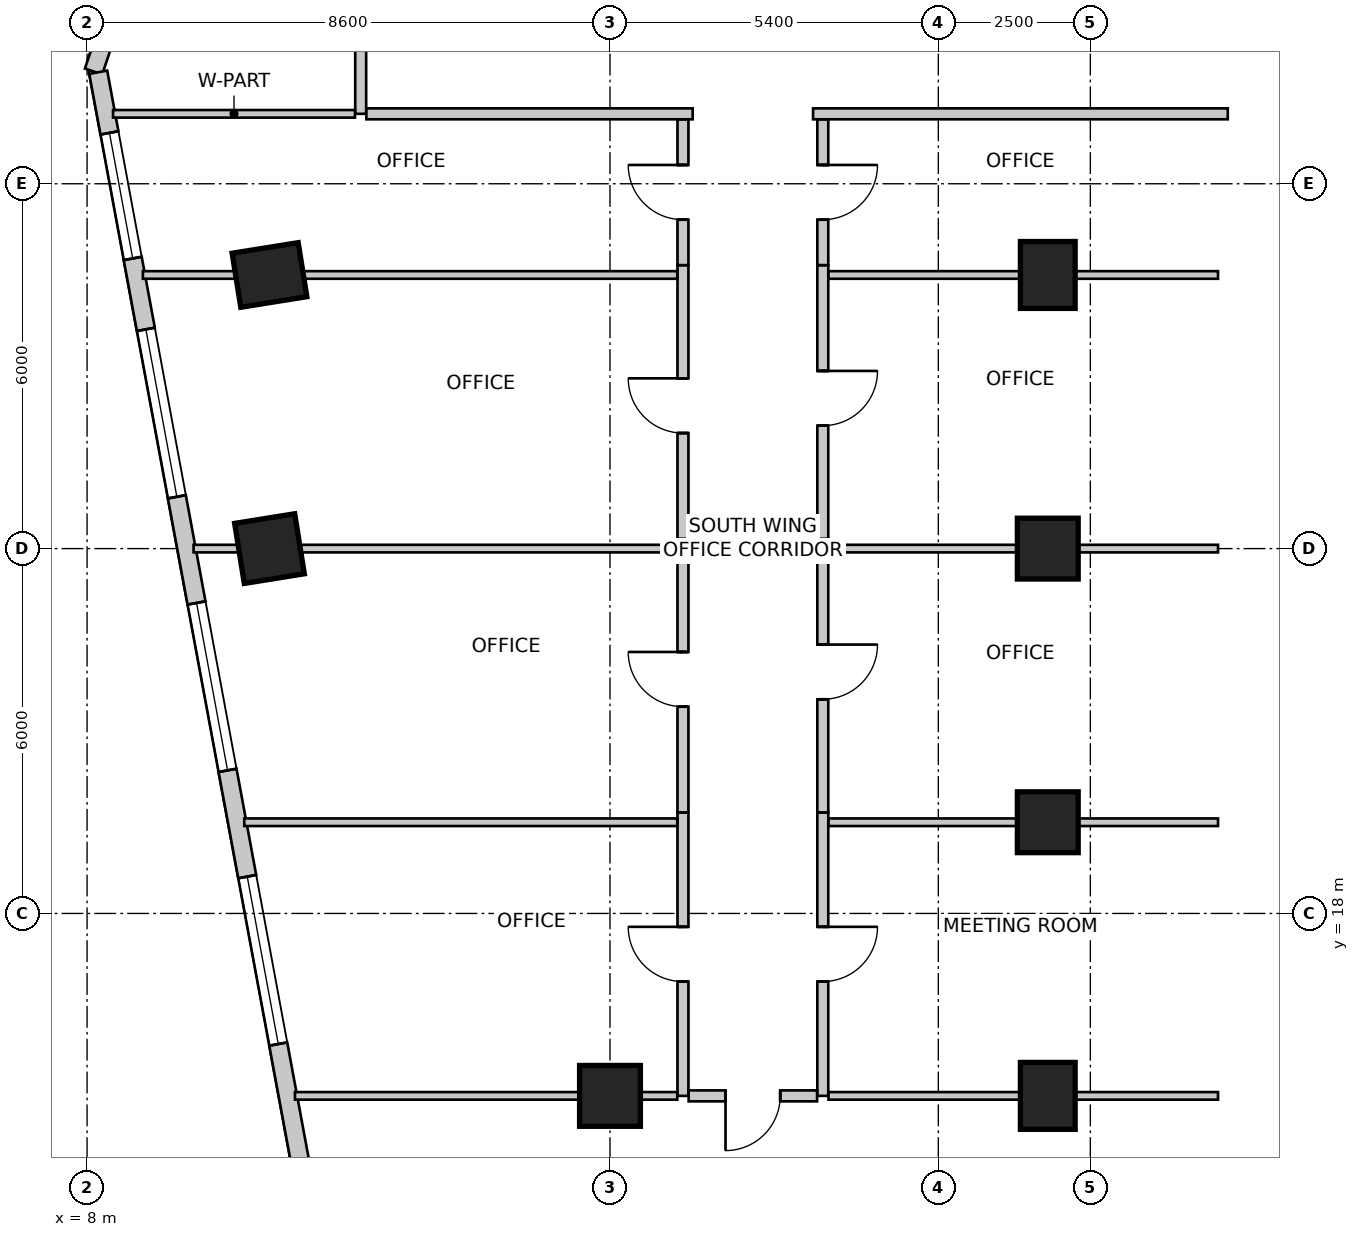
"""IFC4 building model, lengths in metres.
Left out: names, types, materials, properties, quantities, classifications, styles, units other than length and angle.
Written with IfcOpenShell. Run it as: python <this file> out.ifc"""

import sys

from ifc_helpers import new_model, si_unit, direction, frame, frame_2d, origin, origin_2d, place, context, subcontext, project, spatial, rectangle, extrude, source, transform, mapped, element, fill, save


model = new_model("IFC4")
c1 = context("Model", 3, precision=1e-05, world=origin(), true_north=direction((0.0, 1.0)))
c2 = subcontext(c1, "Body", "Model", "MODEL_VIEW")
j1 = project(units=[si_unit("LENGTHUNIT", "METRE"), si_unit("PLANEANGLEUNIT", "RADIAN")], contexts=[c1])
p1 = place(None, origin())
s1 = spatial("IfcSite", under=j1, at=p1, CompositionType="ELEMENT")
p2 = place(p1, origin())
s2 = spatial("IfcBuilding", under=s1, at=p2, CompositionType="ELEMENT")
p3 = place(p2, frame((0.0, 0.0, 55.0)))
s3 = spatial("IfcBuildingStorey", under=s2, at=p3, CompositionType="ELEMENT", Elevation=55.0)
m1 = source(origin(), c2, "Body", "SweptSolid", [
    extrude(rectangle(XDim=0.9, YDim=1.1, at=origin_2d()), origin(), (0.0, 0.0, 1.0), 4.0),
])
p4 = place(p3, frame((11.0, 28.5, 0.0), z_axis=(0.0, 0.0, 1.0), x_axis=(0.158158067254, -0.987413806751, 0.0)))
e1 = element("IfcColumn", 1, at=p4, inside=s3, PredefinedType="COLUMN", context=c2, shape_type="MappedRepresentation", body=[
    mapped(m1, transform((0.0, 0.0, 0.0), scale=1.0)),
])
m2 = source(origin(), c2, "Body", "SweptSolid", [
    extrude(rectangle(XDim=1.0, YDim=1.0, at=origin_2d()), origin(), (0.0, 0.0, 1.0), 4.0),
])
p5 = place(p3, frame((11.0, 24.0, 0.0), z_axis=(0.0, 0.0, 1.0), x_axis=(0.158158067254, -0.987413806751, 0.0)))
e2 = element("IfcColumn", 2, at=p5, inside=s3, PredefinedType="COLUMN", context=c2, shape_type="MappedRepresentation", body=[
    mapped(m2, transform((0.0, 0.0, 0.0), scale=1.0)),
])
p6 = place(p3, frame((23.8, 28.5, 0.0), z_axis=(0.0, 0.0, 1.0), x_axis=(1.0, 0.0, 0.0)))
e3 = element("IfcColumn", 3, at=p6, inside=s3, PredefinedType="COLUMN", context=c2, shape_type="MappedRepresentation", body=[
    mapped(m1, transform((0.0, 0.0, 0.0), scale=1.0)),
])
for number, where, z_axis, x_axis in (
    (4, (23.8, 24.0, 0.0), (0.0, 0.0, 1.0), (1.0, 0.0, 0.0)),
    (5, (23.8, 19.5, 0.0), (0.0, 0.0, 1.0), (1.0, 0.0, 0.0)),
):
    element("IfcColumn", number, at=place(p3, frame(where, z_axis=z_axis, x_axis=x_axis)), inside=s3, PredefinedType="COLUMN", context=c2, shape_type="MappedRepresentation", body=[
        mapped(m2, transform((0.0, 0.0, 0.0), scale=1.0)),
    ])
p7 = place(p3, frame((23.8, 15.0, 0.0), z_axis=(0.0, 0.0, 1.0), x_axis=(1.0, 0.0, 0.0)))
e6 = element("IfcColumn", 6, at=p7, inside=s3, PredefinedType="COLUMN", context=c2, shape_type="MappedRepresentation", body=[
    mapped(m1, transform((0.0, 0.0, 0.0), scale=1.0)),
])
p8 = place(p3, frame((16.6, 15.0, 0.0), z_axis=(0.0, 0.0, 1.0), x_axis=(1.0, 0.0, 0.0)))
e7 = element("IfcColumn", 7, at=p8, inside=s3, PredefinedType="COLUMN", context=c2, shape_type="MappedRepresentation", body=[
    mapped(m2, transform((0.0, 0.0, 0.0), scale=1.0)),
])
p9 = place(p3, frame((13.269, 47.134, 0.0), z_axis=(0.0, 0.0, 1.0), x_axis=(-0.319920423265, -0.947444416722, 0.0)))
e8 = element("IfcWall", 8, at=p9, inside=s3, PredefinedType="SOLIDWALL", context=c2, shape_type="SweptSolid", body=[
    extrude(rectangle(XDim=16.135, YDim=0.3, at=frame_2d((8.067, 0.0))), origin(), (0.0, 0.0, 1.0), 3.75),
])
m3 = source(origin(), c2, "Body", "SweptSolid", [
    extrude(rectangle(XDim=2.4, YDim=2.2, at=frame_2d((1.2, 1.1))), frame((0.0, 0.16, 0.0), z_axis=(0.0, -1.0, 0.0), x_axis=(1.0, 0.0, 0.0)), (0.0, 0.0, 1.0), 0.32),
])
p10 = place(p9, frame((2.188, 0.0, 0.85)))
e9 = element("IfcOpeningElement", 9, at=p10, cuts=e8, PredefinedType="OPENING", context=c2, shape_type="MappedRepresentation", body=[
    mapped(m3, transform((0.0, 0.0, 0.0), scale=1.0)),
])
m4 = source(origin(), c2, "Body", "SweptSolid", [
    extrude(rectangle(XDim=2.8, YDim=2.4, at=frame_2d((1.4, 1.2))), frame((0.0, 0.16, 0.0), z_axis=(0.0, -1.0, 0.0), x_axis=(1.0, 0.0, 0.0)), (0.0, 0.0, 1.0), 0.32),
])
p11 = place(p9, frame((6.959, 0.0, 0.85)))
e10 = element("IfcOpeningElement", 10, at=p11, cuts=e8, PredefinedType="OPENING", context=c2, shape_type="MappedRepresentation", body=[
    mapped(m4, transform((0.0, 0.0, 0.0), scale=1.0)),
])
p12 = place(p9, frame((12.13, 0.0, 0.85)))
e11 = element("IfcOpeningElement", 11, at=p12, cuts=e8, PredefinedType="OPENING", context=c2, shape_type="MappedRepresentation", body=[
    mapped(m3, transform((0.0, 0.0, 0.0), scale=1.0)),
])
p13 = place(p3, frame((8.183, 31.833, 0.0), z_axis=(0.0, 0.0, 1.0), x_axis=(0.18216364648, -0.983268226834, 0.0)))
e12 = element("IfcWall", 12, at=p13, inside=s3, PredefinedType="SOLIDWALL", context=c2, shape_type="SweptSolid", body=[
    extrude(rectangle(XDim=26.678, YDim=0.3, at=frame_2d((13.339, 0.0))), origin(), (0.0, 0.0, 1.0), 3.75),
])
m5 = source(origin(), c2, "Body", "SweptSolid", [
    extrude(rectangle(XDim=2.1, YDim=2.0, at=frame_2d((1.05, 1.0))), frame((0.0, 0.16, 0.0), z_axis=(0.0, -1.0, 0.0), x_axis=(1.0, 0.0, 0.0)), (0.0, 0.0, 1.0), 0.32),
])
p14 = place(p13, frame((1.014, 0.0, 0.85)))
e13 = element("IfcOpeningElement", 13, at=p14, cuts=e12, PredefinedType="OPENING", context=c2, shape_type="MappedRepresentation", body=[
    mapped(m5, transform((0.0, 0.0, 0.0), scale=1.0)),
])
p15 = place(p13, frame((4.3, 0.0, 0.85)))
e14 = element("IfcOpeningElement", 14, at=p15, cuts=e12, PredefinedType="OPENING", context=c2, shape_type="MappedRepresentation", body=[
    mapped(m4, transform((0.0, 0.0, 0.0), scale=1.0)),
])
p16 = place(p13, frame((8.876, 0.0, 0.85)))
e15 = element("IfcOpeningElement", 15, at=p16, cuts=e12, PredefinedType="OPENING", context=c2, shape_type="MappedRepresentation", body=[
    mapped(m4, transform((0.0, 0.0, 0.0), scale=1.0)),
])
p17 = place(p13, frame((13.453, 0.0, 0.85)))
e16 = element("IfcOpeningElement", 16, at=p17, cuts=e12, PredefinedType="OPENING", context=c2, shape_type="MappedRepresentation", body=[
    mapped(m4, transform((0.0, 0.0, 0.0), scale=1.0)),
])
p18 = place(p13, frame((18.211, 0.0, 0.85)))
e17 = element("IfcOpeningElement", 17, at=p18, cuts=e12, PredefinedType="OPENING", context=c2, shape_type="MappedRepresentation", body=[
    mapped(m4, transform((0.0, 0.0, 0.0), scale=1.0)),
])
p19 = place(p13, frame((22.909, 0.0, 0.85)))
e18 = element("IfcOpeningElement", 18, at=p19, cuts=e12, PredefinedType="OPENING", context=c2, shape_type="MappedRepresentation", body=[
    mapped(m3, transform((0.0, 0.0, 0.0), scale=1.0)),
])
p20 = place(p3, frame((12.5, 31.15, 0.0), z_axis=(0.0, 0.0, 1.0), x_axis=(0.0, 1.0, 0.0)))
e19 = element("IfcWall", 19, at=p20, inside=s3, PredefinedType="PARTITIONING", context=c2, shape_type="SweptSolid", body=[
    extrude(rectangle(XDim=2.2, YDim=0.18, at=frame_2d((1.1, 0.0))), origin(), (0.0, 0.0, 1.0), 3.419),
])
p21 = place(p3, frame((17.96, 31.15, 0.0), z_axis=(0.0, 0.0, 1.0), x_axis=(-1.0, 0.0, 0.0)))
e20 = element("IfcWall", 20, at=p21, inside=s3, PredefinedType="PARTITIONING", context=c2, shape_type="SweptSolid", body=[
    extrude(rectangle(XDim=5.366, YDim=0.18, at=frame_2d((2.683, 0.0))), origin(), (0.0, 0.0, 1.0), 3.419),
])
p22 = place(p3, frame((26.76, 31.15, 0.0), z_axis=(0.0, 0.0, 1.0), x_axis=(-1.0, 0.0, 0.0)))
e21 = element("IfcWall", 21, at=p22, inside=s3, PredefinedType="PARTITIONING", context=c2, shape_type="SweptSolid", body=[
    extrude(rectangle(XDim=6.82, YDim=0.18, at=frame_2d((3.41, 0.0))), origin(), (0.0, 0.0, 1.0), 3.419),
])
p23 = place(p3, frame((12.406, 31.15, 0.0), z_axis=(0.0, 0.0, 1.0), x_axis=(-1.0, 0.0, 0.0)))
e22 = element("IfcWall", 22, at=p23, inside=s3, PredefinedType="PARTITIONING", context=c2, shape_type="SweptSolid", body=[
    extrude(rectangle(XDim=3.979, YDim=0.125, at=frame_2d((1.99, 0.0))), origin(), (0.0, 0.0, 1.0), 2.892),
])
p24 = place(p3, frame((17.8, 15.0, 0.0), z_axis=(0.0, 0.0, 1.0), x_axis=(0.0, 1.0, 0.0)))
e23 = element("IfcWall", 23, at=p24, inside=s3, PredefinedType="PARTITIONING", context=c2, shape_type="SweptSolid", body=[
    extrude(rectangle(XDim=4.66, YDim=0.18, at=frame_2d((2.33, 0.0))), origin(), (0.0, 0.0, 1.0), 2.892),
])
m6 = source(origin(), c2, "Body", "SweptSolid", [
    extrude(rectangle(XDim=0.9, YDim=2.15, at=frame_2d((0.45, 1.075))), frame((0.0, 0.1, 0.0), z_axis=(0.0, -1.0, 0.0), x_axis=(1.0, 0.0, 0.0)), (0.0, 0.0, 1.0), 0.2),
])
p25 = place(p24, frame((1.88, 0.0, 0.0)))
e24 = element("IfcOpeningElement", 24, at=p25, cuts=e23, PredefinedType="OPENING", context=c2, shape_type="MappedRepresentation", body=[
    mapped(m6, transform((0.0, 0.0, 0.0), scale=1.0)),
])
p26 = place(p3, frame((20.1, 19.66, 0.0), z_axis=(0.0, 0.0, 1.0), x_axis=(0.0, -1.0, 0.0)))
e25 = element("IfcWall", 25, at=p26, inside=s3, PredefinedType="PARTITIONING", context=c2, shape_type="SweptSolid", body=[
    extrude(rectangle(XDim=4.66, YDim=0.18, at=frame_2d((2.33, 0.0))), origin(), (0.0, 0.0, 1.0), 2.892),
])
p27 = place(p26, frame((1.88, 0.0, 0.0)))
e26 = element("IfcOpeningElement", 26, at=p27, cuts=e25, PredefinedType="OPENING", context=c2, shape_type="MappedRepresentation", body=[
    mapped(m6, transform((0.0, 0.0, 0.0), scale=1.0)),
])
p28 = place(p3, frame((17.8, 19.662, 0.0), z_axis=(0.0, 0.0, 1.0), x_axis=(0.0, 1.0, 0.0)))
e27 = element("IfcWall", 27, at=p28, inside=s3, PredefinedType="PARTITIONING", context=c2, shape_type="SweptSolid", body=[
    extrude(rectangle(XDim=4.498, YDim=0.18, at=frame_2d((2.249, 0.0))), origin(), (0.0, 0.0, 1.0), 3.125),
])
p29 = place(p28, frame((1.738, 0.0, 0.0)))
e28 = element("IfcOpeningElement", 28, at=p29, cuts=e27, PredefinedType="OPENING", context=c2, shape_type="MappedRepresentation", body=[
    mapped(m6, transform((0.0, 0.0, 0.0), scale=1.0)),
])
p30 = place(p3, frame((20.1, 24.16, 0.0), z_axis=(0.0, 0.0, 1.0), x_axis=(0.0, -1.0, 0.0)))
e29 = element("IfcWall", 29, at=p30, inside=s3, PredefinedType="PARTITIONING", context=c2, shape_type="SweptSolid", body=[
    extrude(rectangle(XDim=4.498, YDim=0.18, at=frame_2d((2.249, 0.0))), origin(), (0.0, 0.0, 1.0), 3.125),
])
p31 = place(p30, frame((1.738, 0.0, 0.0)))
e30 = element("IfcOpeningElement", 30, at=p31, cuts=e29, PredefinedType="OPENING", context=c2, shape_type="MappedRepresentation", body=[
    mapped(m6, transform((0.0, 0.0, 0.0), scale=1.0)),
])
p32 = place(p3, frame((17.8, 24.162, 0.0), z_axis=(0.0, 0.0, 1.0), x_axis=(0.0, 1.0, 0.0)))
e31 = element("IfcWall", 31, at=p32, inside=s3, PredefinedType="PARTITIONING", context=c2, shape_type="SweptSolid", body=[
    extrude(rectangle(XDim=4.498, YDim=0.18, at=frame_2d((2.249, 0.0))), origin(), (0.0, 0.0, 1.0), 3.125),
])
p33 = place(p32, frame((1.738, 0.0, 0.0)))
e32 = element("IfcOpeningElement", 32, at=p33, cuts=e31, PredefinedType="OPENING", context=c2, shape_type="MappedRepresentation", body=[
    mapped(m6, transform((0.0, 0.0, 0.0), scale=1.0)),
])
p34 = place(p3, frame((20.1, 28.66, 0.0), z_axis=(0.0, 0.0, 1.0), x_axis=(0.0, -1.0, 0.0)))
e33 = element("IfcWall", 33, at=p34, inside=s3, PredefinedType="PARTITIONING", context=c2, shape_type="SweptSolid", body=[
    extrude(rectangle(XDim=4.498, YDim=0.18, at=frame_2d((2.249, 0.0))), origin(), (0.0, 0.0, 1.0), 3.125),
])
p35 = place(p34, frame((1.738, 0.0, 0.0)))
e34 = element("IfcOpeningElement", 34, at=p35, cuts=e33, PredefinedType="OPENING", context=c2, shape_type="MappedRepresentation", body=[
    mapped(m6, transform((0.0, 0.0, 0.0), scale=1.0)),
])
p36 = place(p3, frame((17.8, 28.662, 0.0), z_axis=(0.0, 0.0, 1.0), x_axis=(0.0, 1.0, 0.0)))
e35 = element("IfcWall", 35, at=p36, inside=s3, PredefinedType="PARTITIONING", context=c2, shape_type="SweptSolid", body=[
    extrude(rectangle(XDim=2.394, YDim=0.18, at=frame_2d((1.197, 0.0))), origin(), (0.0, 0.0, 1.0), 3.419),
])
p37 = place(p36, frame((0.747, 0.0, 0.0)))
e36 = element("IfcOpeningElement", 36, at=p37, cuts=e35, PredefinedType="OPENING", context=c2, shape_type="MappedRepresentation", body=[
    mapped(m6, transform((0.0, 0.0, 0.0), scale=1.0)),
])
p38 = place(p3, frame((20.1, 31.056, 0.0), z_axis=(0.0, 0.0, 1.0), x_axis=(0.0, -1.0, 0.0)))
e37 = element("IfcWall", 37, at=p38, inside=s3, PredefinedType="PARTITIONING", context=c2, shape_type="SweptSolid", body=[
    extrude(rectangle(XDim=2.394, YDim=0.18, at=frame_2d((1.197, 0.0))), origin(), (0.0, 0.0, 1.0), 3.419),
])
p39 = place(p38, frame((0.747, 0.0, 0.0)))
e38 = element("IfcOpeningElement", 38, at=p39, cuts=e37, PredefinedType="OPENING", context=c2, shape_type="MappedRepresentation", body=[
    mapped(m6, transform((0.0, 0.0, 0.0), scale=1.0)),
])
p40 = place(p3, frame((20.006, 15.0, 0.0), z_axis=(0.0, 0.0, 1.0), x_axis=(-1.0, 0.0, 0.0)))
e39 = element("IfcWall", 39, at=p40, inside=s3, PredefinedType="PARTITIONING", context=c2, shape_type="SweptSolid", body=[
    extrude(rectangle(XDim=2.112, YDim=0.18, at=frame_2d((1.056, 0.0))), origin(), (0.0, 0.0, 1.0), 2.892),
])
p41 = place(p40, frame((0.606, 0.0, 0.0)))
e40 = element("IfcOpeningElement", 40, at=p41, cuts=e39, PredefinedType="OPENING", context=c2, shape_type="MappedRepresentation", body=[
    mapped(m6, transform((0.0, 0.0, 0.0), scale=1.0)),
])
p42 = place(p3, frame((10.585, 19.5, 0.0), z_axis=(0.0, 0.0, 1.0), x_axis=(1.0, 0.0, 0.0)))
e41 = element("IfcWall", 41, at=p42, inside=s3, PredefinedType="PARTITIONING", context=c2, shape_type="SweptSolid", body=[
    extrude(rectangle(XDim=7.121, YDim=0.125, at=frame_2d((3.561, 0.0))), origin(), (0.0, 0.0, 1.0), 3.75),
])
p43 = place(p3, frame((17.706, 15.0, 0.0), z_axis=(0.0, 0.0, 1.0), x_axis=(-1.0, 0.0, 0.0)))
e42 = element("IfcWall", 42, at=p43, inside=s3, PredefinedType="PARTITIONING", context=c2, shape_type="SweptSolid", body=[
    extrude(rectangle(XDim=6.287, YDim=0.125, at=frame_2d((3.144, 0.0))), origin(), (0.0, 0.0, 1.0), 2.892),
])
for number, where, z_axis, x_axis in (
    (43, (20.194, 19.5, 0.0), (0.0, 0.0, 1.0), (1.0, 0.0, 0.0)),
    (44, (26.6, 15.0, 0.0), (0.0, 0.0, 1.0), (-1.0, 0.0, 0.0)),
):
    element("IfcWall", number, at=place(p3, frame(where, z_axis=z_axis, x_axis=x_axis)), inside=s3, PredefinedType="PARTITIONING", context=c2, shape_type="SweptSolid", body=[
        extrude(rectangle(XDim=6.406, YDim=0.125, at=frame_2d((3.203, 0.0))), origin(), (0.0, 0.0, 1.0), 2.892),
    ])
p44 = place(p3, frame((9.752, 24.0, 0.0), z_axis=(0.0, 0.0, 1.0), x_axis=(1.0, 0.0, 0.0)))
e45 = element("IfcWall", 45, at=p44, inside=s3, PredefinedType="PARTITIONING", context=c2, shape_type="SweptSolid", body=[
    extrude(rectangle(XDim=7.954, YDim=0.125, at=frame_2d((3.977, 0.0))), origin(), (0.0, 0.0, 1.0), 2.892),
])
p45 = place(p3, frame((20.194, 24.0, 0.0), z_axis=(0.0, 0.0, 1.0), x_axis=(1.0, 0.0, 0.0)))
e46 = element("IfcWall", 46, at=p45, inside=s3, PredefinedType="PARTITIONING", context=c2, shape_type="SweptSolid", body=[
    extrude(rectangle(XDim=6.406, YDim=0.125, at=frame_2d((3.203, 0.0))), origin(), (0.0, 0.0, 1.0), 2.892),
])
p46 = place(p3, frame((8.918, 28.5, 0.0), z_axis=(0.0, 0.0, 1.0), x_axis=(1.0, 0.0, 0.0)))
e47 = element("IfcWall", 47, at=p46, inside=s3, PredefinedType="PARTITIONING", context=c2, shape_type="SweptSolid", body=[
    extrude(rectangle(XDim=8.788, YDim=0.125, at=frame_2d((4.394, 0.0))), origin(), (0.0, 0.0, 1.0), 2.892),
])
p47 = place(p3, frame((20.194, 28.5, 0.0), z_axis=(0.0, 0.0, 1.0), x_axis=(1.0, 0.0, 0.0)))
e48 = element("IfcWall", 48, at=p47, inside=s3, PredefinedType="PARTITIONING", context=c2, shape_type="SweptSolid", body=[
    extrude(rectangle(XDim=6.406, YDim=0.125, at=frame_2d((3.203, 0.0))), origin(), (0.0, 0.0, 1.0), 2.892),
])
m7 = source(origin(), c2, "Body", "SweptSolid", [
    extrude(rectangle(XDim=2.1, YDim=2.0, at=frame_2d((1.05, 1.0))), frame((0.0, -0.015, 0.0), z_axis=(0.0, -1.0, 0.0), x_axis=(1.0, 0.0, 0.0)), (0.0, 0.0, 1.0), 0.06),
])
p48 = place(p14, origin())
e49 = element("IfcWindow", 49, at=p48, inside=s3, PartitioningType="SINGLE_PANEL", PredefinedType="WINDOW", context=c2, shape_type="MappedRepresentation", body=[
    mapped(m7, transform((0.0, 0.0, 0.0), scale=1.0)),
])
fill(e13, e49)
m8 = source(origin(), c2, "Body", "SweptSolid", [
    extrude(rectangle(XDim=2.8, YDim=2.4, at=frame_2d((1.4, 1.2))), frame((0.0, -0.015, 0.0), z_axis=(0.0, -1.0, 0.0), x_axis=(1.0, 0.0, 0.0)), (0.0, 0.0, 1.0), 0.06),
])
p49 = place(p15, origin())
e50 = element("IfcWindow", 50, at=p49, inside=s3, PartitioningType="SINGLE_PANEL", PredefinedType="WINDOW", context=c2, shape_type="MappedRepresentation", body=[
    mapped(m8, transform((0.0, 0.0, 0.0), scale=1.0)),
])
fill(e14, e50)
p50 = place(p16, origin())
e51 = element("IfcWindow", 51, at=p50, inside=s3, PartitioningType="SINGLE_PANEL", PredefinedType="WINDOW", context=c2, shape_type="MappedRepresentation", body=[
    mapped(m8, transform((0.0, 0.0, 0.0), scale=1.0)),
])
fill(e15, e51)
p51 = place(p17, origin())
e52 = element("IfcWindow", 52, at=p51, inside=s3, PartitioningType="SINGLE_PANEL", PredefinedType="WINDOW", context=c2, shape_type="MappedRepresentation", body=[
    mapped(m8, transform((0.0, 0.0, 0.0), scale=1.0)),
])
fill(e16, e52)
m9 = source(origin(), c2, "Body", "SweptSolid", [
    extrude(rectangle(XDim=0.9, YDim=2.15, at=frame_2d((0.45, 1.075))), frame((0.0, 0.025, 0.0), z_axis=(0.0, -1.0, 0.0), x_axis=(1.0, 0.0, 0.0)), (0.0, 0.0, 1.0), 0.05),
])
p52 = place(p25, origin())
e53 = element("IfcDoor", 53, at=p52, inside=s3, OperationType="SINGLE_SWING_RIGHT", PredefinedType="DOOR", context=c2, shape_type="MappedRepresentation", body=[
    mapped(m9, transform((0.0, 0.0, 0.0), scale=1.0)),
])
fill(e24, e53)
p53 = place(p27, origin())
e54 = element("IfcDoor", 54, at=p53, inside=s3, OperationType="SINGLE_SWING_LEFT", PredefinedType="DOOR", context=c2, shape_type="MappedRepresentation", body=[
    mapped(m9, transform((0.0, 0.0, 0.0), scale=1.0)),
])
fill(e26, e54)
p54 = place(p29, origin())
e55 = element("IfcDoor", 55, at=p54, inside=s3, OperationType="SINGLE_SWING_RIGHT", PredefinedType="DOOR", context=c2, shape_type="MappedRepresentation", body=[
    mapped(m9, transform((0.0, 0.0, 0.0), scale=1.0)),
])
fill(e28, e55)
p55 = place(p31, origin())
e56 = element("IfcDoor", 56, at=p55, inside=s3, OperationType="SINGLE_SWING_LEFT", PredefinedType="DOOR", context=c2, shape_type="MappedRepresentation", body=[
    mapped(m9, transform((0.0, 0.0, 0.0), scale=1.0)),
])
fill(e30, e56)
p56 = place(p33, origin())
e57 = element("IfcDoor", 57, at=p56, inside=s3, OperationType="SINGLE_SWING_RIGHT", PredefinedType="DOOR", context=c2, shape_type="MappedRepresentation", body=[
    mapped(m9, transform((0.0, 0.0, 0.0), scale=1.0)),
])
fill(e32, e57)
p57 = place(p35, origin())
e58 = element("IfcDoor", 58, at=p57, inside=s3, OperationType="SINGLE_SWING_LEFT", PredefinedType="DOOR", context=c2, shape_type="MappedRepresentation", body=[
    mapped(m9, transform((0.0, 0.0, 0.0), scale=1.0)),
])
fill(e34, e58)
p58 = place(p37, origin())
e59 = element("IfcDoor", 59, at=p58, inside=s3, OperationType="SINGLE_SWING_RIGHT", PredefinedType="DOOR", context=c2, shape_type="MappedRepresentation", body=[
    mapped(m9, transform((0.0, 0.0, 0.0), scale=1.0)),
])
fill(e36, e59)
p59 = place(p39, origin())
e60 = element("IfcDoor", 60, at=p59, inside=s3, OperationType="SINGLE_SWING_LEFT", PredefinedType="DOOR", context=c2, shape_type="MappedRepresentation", body=[
    mapped(m9, transform((0.0, 0.0, 0.0), scale=1.0)),
])
fill(e38, e60)
p60 = place(p41, origin())
e61 = element("IfcDoor", 61, at=p60, inside=s3, OperationType="SINGLE_SWING_RIGHT", PredefinedType="DOOR", context=c2, shape_type="MappedRepresentation", body=[
    mapped(m9, transform((0.0, 0.0, 0.0), scale=1.0)),
])
fill(e40, e61)
save(model, sys.argv[1])
